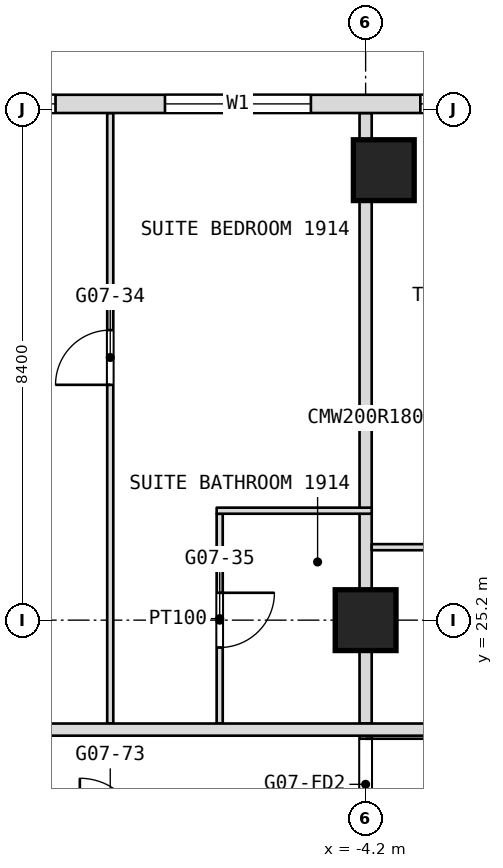
"""IFC4 building model, lengths in metres.
Left out: names, types, materials, properties, quantities, classifications, styles, units other than length and angle.
Written with IfcOpenShell. Run it as: python <this file> out.ifc"""

import sys

from ifc_helpers import new_model, si_unit, direction, frame, frame_2d, origin, origin_2d, place, context, subcontext, project, spatial, rectangle, extrude, element, fill, save


model = new_model("IFC4")
c1 = context("Model", 3, precision=1e-05, world=origin(), true_north=direction((0.0, 1.0)))
c2 = subcontext(c1, "Body", "Model", "MODEL_VIEW")
j1 = project(units=[si_unit("LENGTHUNIT", "METRE"), si_unit("PLANEANGLEUNIT", "RADIAN")], contexts=[c1])
p1 = place(None, origin())
s1 = spatial("IfcSite", under=j1, at=p1, CompositionType="ELEMENT")
p2 = place(p1, origin())
s2 = spatial("IfcBuilding", under=s1, at=p2, CompositionType="ELEMENT")
p3 = place(p2, frame((0.0, 0.0, 83.3)))
s3 = spatial("IfcBuildingStorey", under=s2, at=p3, CompositionType="ELEMENT", Elevation=83.3)
for number, where, z_axis, x_axis in (
    (1, (-4.2, 25.2, 0.0), (0.0, 0.0, 1.0), (1.0, 0.0, 0.0)),
    (2, (-3.901, 32.6, 0.0), (0.0, 0.0, 1.0), (1.0, 0.0, 0.0)),
):
    element("IfcColumn", number, at=place(p3, frame(where, z_axis=z_axis, x_axis=x_axis)), inside=s3, PredefinedType="COLUMN", context=c2, shape_type="SweptSolid", body=[
        extrude(rectangle(XDim=1.0, YDim=1.0, at=origin_2d()), origin(), (0.0, 0.0, 1.0), 3.6),
    ])
p4 = place(p3, frame((-4.2, 16.8, 0.0), z_axis=(0.0, 0.0, 1.0), x_axis=(0.0, 1.0, 0.0)))
e3 = element("IfcWall", 3, at=p4, inside=s3, PredefinedType="PARTITIONING", context=c2, shape_type="SweptSolid", body=[
    extrude(rectangle(XDim=6.7, YDim=0.2, at=frame_2d((3.35, 0.0))), origin(), (0.0, 0.0, 1.0), 3.3),
])
p5 = place(p4, frame((0.15, 0.0, 0.0)))
e4 = element("IfcOpeningElement", 4, at=p5, cuts=e3, PredefinedType="OPENING", context=c2, shape_type="SweptSolid", body=[
    extrude(rectangle(XDim=1.5, YDim=2.1, at=frame_2d((0.75, 1.05))), frame((0.0, 0.1, 0.0), z_axis=(0.0, -1.0, 0.0), x_axis=(1.0, 0.0, 0.0)), (0.0, 0.0, 1.0), 0.2),
])
p6 = place(p4, frame((4.95, 0.0, 0.0)))
e5 = element("IfcOpeningElement", 5, at=p6, cuts=e3, PredefinedType="OPENING", context=c2, shape_type="SweptSolid", body=[
    extrude(rectangle(XDim=1.5, YDim=2.1, at=frame_2d((0.75, 1.05))), frame((0.0, 0.1, 0.0), z_axis=(0.0, -1.0, 0.0), x_axis=(1.0, 0.0, 0.0)), (0.0, 0.0, 1.0), 0.2),
])
p7 = place(p3, frame((-4.2, 23.5, 0.0), z_axis=(0.0, 0.0, 1.0), x_axis=(0.0, 1.0, 0.0)))
e6 = element("IfcWall", 6, at=p7, inside=s3, PredefinedType="PARTITIONING", context=c2, shape_type="SweptSolid", body=[
    extrude(rectangle(XDim=10.04, YDim=0.2, at=frame_2d((5.02, 0.0))), origin(), (0.0, 0.0, 1.0), 3.3),
])
p8 = place(p3, frame((-6.6, 23.5, 0.0), z_axis=(0.0, 0.0, 1.0), x_axis=(0.0, 1.0, 0.0)))
e7 = element("IfcWall", 7, at=p8, inside=s3, PredefinedType="PARTITIONING", context=c2, shape_type="SweptSolid", body=[
    extrude(rectangle(XDim=3.45, YDim=0.1, at=frame_2d((1.725, 0.0))), origin(), (0.0, 0.0, 1.0), 3.3),
])
p9 = place(p8, frame((1.25, 0.0, 0.0)))
e8 = element("IfcOpeningElement", 8, at=p9, cuts=e7, PredefinedType="OPENING", context=c2, shape_type="SweptSolid", body=[
    extrude(rectangle(XDim=0.9, YDim=2.1, at=frame_2d((0.45, 1.05))), frame((0.0, 0.05, 0.0), z_axis=(0.0, -1.0, 0.0), x_axis=(1.0, 0.0, 0.0)), (0.0, 0.0, 1.0), 0.1),
])
p10 = place(p3, frame((-8.4, 23.5, 0.0), z_axis=(0.0, 0.0, 1.0), x_axis=(0.0, 1.0, 0.0)))
e9 = element("IfcWall", 9, at=p10, inside=s3, PredefinedType="PARTITIONING", context=c2, shape_type="SweptSolid", body=[
    extrude(rectangle(XDim=10.04, YDim=0.1, at=frame_2d((5.02, 0.0))), origin(), (0.0, 0.0, 1.0), 3.3),
])
p11 = place(p10, frame((5.57, 0.0, 0.0)))
e10 = element("IfcOpeningElement", 10, at=p11, cuts=e9, PredefinedType="OPENING", context=c2, shape_type="SweptSolid", body=[
    extrude(rectangle(XDim=0.9, YDim=2.1, at=frame_2d((0.45, 1.05))), frame((0.0, 0.05, 0.0), z_axis=(0.0, -1.0, 0.0), x_axis=(1.0, 0.0, 0.0)), (0.0, 0.0, 1.0), 0.1),
])
p12 = place(p3, frame((-16.7, 23.4, 0.0), z_axis=(0.0, 0.0, 1.0), x_axis=(1.0, 0.0, 0.0)))
e11 = element("IfcWall", 11, at=p12, inside=s3, PredefinedType="PARTITIONING", context=c2, shape_type="SweptSolid", body=[
    extrude(rectangle(XDim=23.4, YDim=0.2, at=frame_2d((11.7, 0.0))), origin(), (0.0, 0.0, 1.0), 3.3),
])
p13 = place(p12, frame((2.4, 0.0, 0.0)))
e12 = element("IfcOpeningElement", 12, at=p13, cuts=e11, PredefinedType="OPENING", context=c2, shape_type="SweptSolid", body=[
    extrude(rectangle(XDim=0.9, YDim=2.1, at=frame_2d((0.45, 1.05))), frame((0.0, 0.1, 0.0), z_axis=(0.0, -1.0, 0.0), x_axis=(1.0, 0.0, 0.0)), (0.0, 0.0, 1.0), 0.2),
])
p14 = place(p12, frame((5.65, 0.0, 0.0)))
e13 = element("IfcOpeningElement", 13, at=p14, cuts=e11, PredefinedType="OPENING", context=c2, shape_type="SweptSolid", body=[
    extrude(rectangle(XDim=1.1, YDim=2.1, at=frame_2d((0.55, 1.05))), frame((0.0, 0.1, 0.0), z_axis=(0.0, -1.0, 0.0), x_axis=(1.0, 0.0, 0.0)), (0.0, 0.0, 1.0), 0.2),
])
p15 = place(p12, frame((15.3, 0.0, 0.0)))
e14 = element("IfcOpeningElement", 14, at=p15, cuts=e11, PredefinedType="OPENING", context=c2, shape_type="SweptSolid", body=[
    extrude(rectangle(XDim=1.0, YDim=2.1, at=frame_2d((0.5, 1.05))), frame((0.0, 0.1, 0.0), z_axis=(0.0, -1.0, 0.0), x_axis=(1.0, 0.0, 0.0)), (0.0, 0.0, 1.0), 0.2),
])
p16 = place(p12, frame((17.1, 0.0, 0.0)))
e15 = element("IfcOpeningElement", 15, at=p16, cuts=e11, PredefinedType="OPENING", context=c2, shape_type="SweptSolid", body=[
    extrude(rectangle(XDim=1.0, YDim=2.1, at=frame_2d((0.5, 1.05))), frame((0.0, 0.1, 0.0), z_axis=(0.0, -1.0, 0.0), x_axis=(1.0, 0.0, 0.0)), (0.0, 0.0, 1.0), 0.2),
])
p17 = place(p3, frame((-4.1, 26.4, 0.0), z_axis=(0.0, 0.0, 1.0), x_axis=(1.0, 0.0, 0.0)))
e16 = element("IfcWall", 16, at=p17, inside=s3, PredefinedType="PARTITIONING", context=c2, shape_type="SweptSolid", body=[
    extrude(rectangle(XDim=2.25, YDim=0.1, at=frame_2d((1.125, 0.0))), origin(), (0.0, 0.0, 1.0), 3.3),
])
p18 = place(p17, frame((1.2, 0.0, 0.0)))
e17 = element("IfcOpeningElement", 17, at=p18, cuts=e16, PredefinedType="OPENING", context=c2, shape_type="SweptSolid", body=[
    extrude(rectangle(XDim=0.9, YDim=2.1, at=frame_2d((0.45, 1.05))), frame((0.0, 0.05, 0.0), z_axis=(0.0, -1.0, 0.0), x_axis=(1.0, 0.0, 0.0)), (0.0, 0.0, 1.0), 0.1),
])
p19 = place(p3, frame((-6.65, 27.0, 0.0), z_axis=(0.0, 0.0, 1.0), x_axis=(1.0, 0.0, 0.0)))
e18 = element("IfcWall", 18, at=p19, inside=s3, PredefinedType="PARTITIONING", context=c2, shape_type="SweptSolid", body=[
    extrude(rectangle(XDim=2.55, YDim=0.1, at=frame_2d((1.275, 0.0))), origin(), (0.0, 0.0, 1.0), 3.3),
])
p20 = place(p3, frame((23.406, 33.69, 0.0), z_axis=(0.0, 0.0, 1.0), x_axis=(-1.0, 0.0, 0.0)))
e19 = element("IfcWall", 19, at=p20, inside=s3, PredefinedType="NOTDEFINED", context=c2, shape_type="SweptSolid", body=[
    extrude(rectangle(XDim=46.812, YDim=0.3, at=frame_2d((23.406, 0.0))), origin(), (0.0, 0.0, 1.0), 3.6),
])
p21 = place(p20, frame((2.186, 0.0, 0.9)))
e20 = element("IfcOpeningElement", 20, at=p21, cuts=e19, PredefinedType="OPENING", context=c2, shape_type="SweptSolid", body=[
    extrude(rectangle(XDim=2.4, YDim=2.1, at=frame_2d((1.2, 1.05))), frame((0.0, 0.15, 0.0), z_axis=(0.0, -1.0, 0.0), x_axis=(1.0, 0.0, 0.0)), (0.0, 0.0, 1.0), 0.3),
])
p22 = place(p20, frame((7.506, 0.0, 0.9)))
e21 = element("IfcOpeningElement", 21, at=p22, cuts=e19, PredefinedType="OPENING", context=c2, shape_type="SweptSolid", body=[
    extrude(rectangle(XDim=2.4, YDim=2.1, at=frame_2d((1.2, 1.05))), frame((0.0, 0.15, 0.0), z_axis=(0.0, -1.0, 0.0), x_axis=(1.0, 0.0, 0.0)), (0.0, 0.0, 1.0), 0.3),
])
p23 = place(p20, frame((11.706, 0.0, 0.9)))
e22 = element("IfcOpeningElement", 22, at=p23, cuts=e19, PredefinedType="OPENING", context=c2, shape_type="SweptSolid", body=[
    extrude(rectangle(XDim=2.4, YDim=2.1, at=frame_2d((1.2, 1.05))), frame((0.0, 0.15, 0.0), z_axis=(0.0, -1.0, 0.0), x_axis=(1.0, 0.0, 0.0)), (0.0, 0.0, 1.0), 0.3),
])
p24 = place(p20, frame((15.906, 0.0, 0.9)))
e23 = element("IfcOpeningElement", 23, at=p24, cuts=e19, PredefinedType="OPENING", context=c2, shape_type="SweptSolid", body=[
    extrude(rectangle(XDim=2.4, YDim=2.1, at=frame_2d((1.2, 1.05))), frame((0.0, 0.15, 0.0), z_axis=(0.0, -1.0, 0.0), x_axis=(1.0, 0.0, 0.0)), (0.0, 0.0, 1.0), 0.3),
])
p25 = place(p20, frame((20.106, 0.0, 0.9)))
e24 = element("IfcOpeningElement", 24, at=p25, cuts=e19, PredefinedType="OPENING", context=c2, shape_type="SweptSolid", body=[
    extrude(rectangle(XDim=2.4, YDim=2.1, at=frame_2d((1.2, 1.05))), frame((0.0, 0.15, 0.0), z_axis=(0.0, -1.0, 0.0), x_axis=(1.0, 0.0, 0.0)), (0.0, 0.0, 1.0), 0.3),
])
p26 = place(p20, frame((24.306, 0.0, 0.9)))
e25 = element("IfcOpeningElement", 25, at=p26, cuts=e19, PredefinedType="OPENING", context=c2, shape_type="SweptSolid", body=[
    extrude(rectangle(XDim=2.4, YDim=2.1, at=frame_2d((1.2, 1.05))), frame((0.0, 0.15, 0.0), z_axis=(0.0, -1.0, 0.0), x_axis=(1.0, 0.0, 0.0)), (0.0, 0.0, 1.0), 0.3),
])
p27 = place(p20, frame((28.506, 0.0, 0.9)))
e26 = element("IfcOpeningElement", 26, at=p27, cuts=e19, PredefinedType="OPENING", context=c2, shape_type="SweptSolid", body=[
    extrude(rectangle(XDim=2.4, YDim=2.1, at=frame_2d((1.2, 1.05))), frame((0.0, 0.15, 0.0), z_axis=(0.0, -1.0, 0.0), x_axis=(1.0, 0.0, 0.0)), (0.0, 0.0, 1.0), 0.3),
])
p28 = place(p20, frame((32.706, 0.0, 0.9)))
e27 = element("IfcOpeningElement", 27, at=p28, cuts=e19, PredefinedType="OPENING", context=c2, shape_type="SweptSolid", body=[
    extrude(rectangle(XDim=2.4, YDim=2.1, at=frame_2d((1.2, 1.05))), frame((0.0, 0.15, 0.0), z_axis=(0.0, -1.0, 0.0), x_axis=(1.0, 0.0, 0.0)), (0.0, 0.0, 1.0), 0.3),
])
p29 = place(p20, frame((36.906, 0.0, 0.9)))
e28 = element("IfcOpeningElement", 28, at=p29, cuts=e19, PredefinedType="OPENING", context=c2, shape_type="SweptSolid", body=[
    extrude(rectangle(XDim=2.4, YDim=2.1, at=frame_2d((1.2, 1.05))), frame((0.0, 0.15, 0.0), z_axis=(0.0, -1.0, 0.0), x_axis=(1.0, 0.0, 0.0)), (0.0, 0.0, 1.0), 0.3),
])
p30 = place(p20, frame((42.226, 0.0, 0.9)))
e29 = element("IfcOpeningElement", 29, at=p30, cuts=e19, PredefinedType="OPENING", context=c2, shape_type="SweptSolid", body=[
    extrude(rectangle(XDim=2.4, YDim=2.1, at=frame_2d((1.2, 1.05))), frame((0.0, 0.15, 0.0), z_axis=(0.0, -1.0, 0.0), x_axis=(1.0, 0.0, 0.0)), (0.0, 0.0, 1.0), 0.3),
])
p31 = place(p9, origin())
e30 = element("IfcDoor", 30, at=p31, inside=s3, OperationType="SINGLE_SWING_RIGHT", PredefinedType="DOOR", context=c2, shape_type="SweptSolid", body=[
    extrude(rectangle(XDim=0.9, YDim=2.1, at=frame_2d((0.45, 1.05))), frame((0.0, 0.025, 0.0), z_axis=(0.0, -1.0, 0.0), x_axis=(1.0, 0.0, 0.0)), (0.0, 0.0, 1.0), 0.05),
])
fill(e8, e30)
p32 = place(p11, origin())
e31 = element("IfcDoor", 31, at=p32, inside=s3, OperationType="SINGLE_SWING_RIGHT", PredefinedType="DOOR", context=c2, shape_type="SweptSolid", body=[
    extrude(rectangle(XDim=0.9, YDim=2.1, at=frame_2d((0.45, 1.05))), frame((0.0, 0.025, 0.0), z_axis=(0.0, -1.0, 0.0), x_axis=(1.0, 0.0, 0.0)), (0.0, 0.0, 1.0), 0.05),
])
fill(e10, e31)
p33 = place(p26, origin())
e32 = element("IfcWindow", 32, at=p33, inside=s3, PartitioningType="SINGLE_PANEL", PredefinedType="WINDOW", context=c2, shape_type="SweptSolid", body=[
    extrude(rectangle(XDim=2.4, YDim=2.1, at=frame_2d((1.2, 1.05))), frame((0.0, 0.03, 0.0), z_axis=(0.0, -1.0, 0.0), x_axis=(1.0, 0.0, 0.0)), (0.0, 0.0, 1.0), 0.06),
])
fill(e25, e32)
p34 = place(p27, origin())
e33 = element("IfcWindow", 33, at=p34, inside=s3, PartitioningType="SINGLE_PANEL", PredefinedType="WINDOW", context=c2, shape_type="SweptSolid", body=[
    extrude(rectangle(XDim=2.4, YDim=2.1, at=frame_2d((1.2, 1.05))), frame((0.0, 0.03, 0.0), z_axis=(0.0, -1.0, 0.0), x_axis=(1.0, 0.0, 0.0)), (0.0, 0.0, 1.0), 0.06),
])
fill(e26, e33)
p35 = place(p28, origin())
e34 = element("IfcWindow", 34, at=p35, inside=s3, PartitioningType="SINGLE_PANEL", PredefinedType="WINDOW", context=c2, shape_type="SweptSolid", body=[
    extrude(rectangle(XDim=2.4, YDim=2.1, at=frame_2d((1.2, 1.05))), frame((0.0, 0.03, 0.0), z_axis=(0.0, -1.0, 0.0), x_axis=(1.0, 0.0, 0.0)), (0.0, 0.0, 1.0), 0.06),
])
fill(e27, e34)
p36 = place(p6, origin())
e35 = element("IfcDoor", 35, at=p36, inside=s3, OperationType="DOUBLE_DOOR_DOUBLE_SWING", PredefinedType="DOOR", context=c2, shape_type="SweptSolid", body=[
    extrude(rectangle(XDim=1.5, YDim=2.1, at=frame_2d((0.75, 1.05))), frame((0.0, 0.025, 0.0), z_axis=(0.0, -1.0, 0.0), x_axis=(1.0, 0.0, 0.0)), (0.0, 0.0, 1.0), 0.05),
])
fill(e5, e35)
save(model, sys.argv[1])
